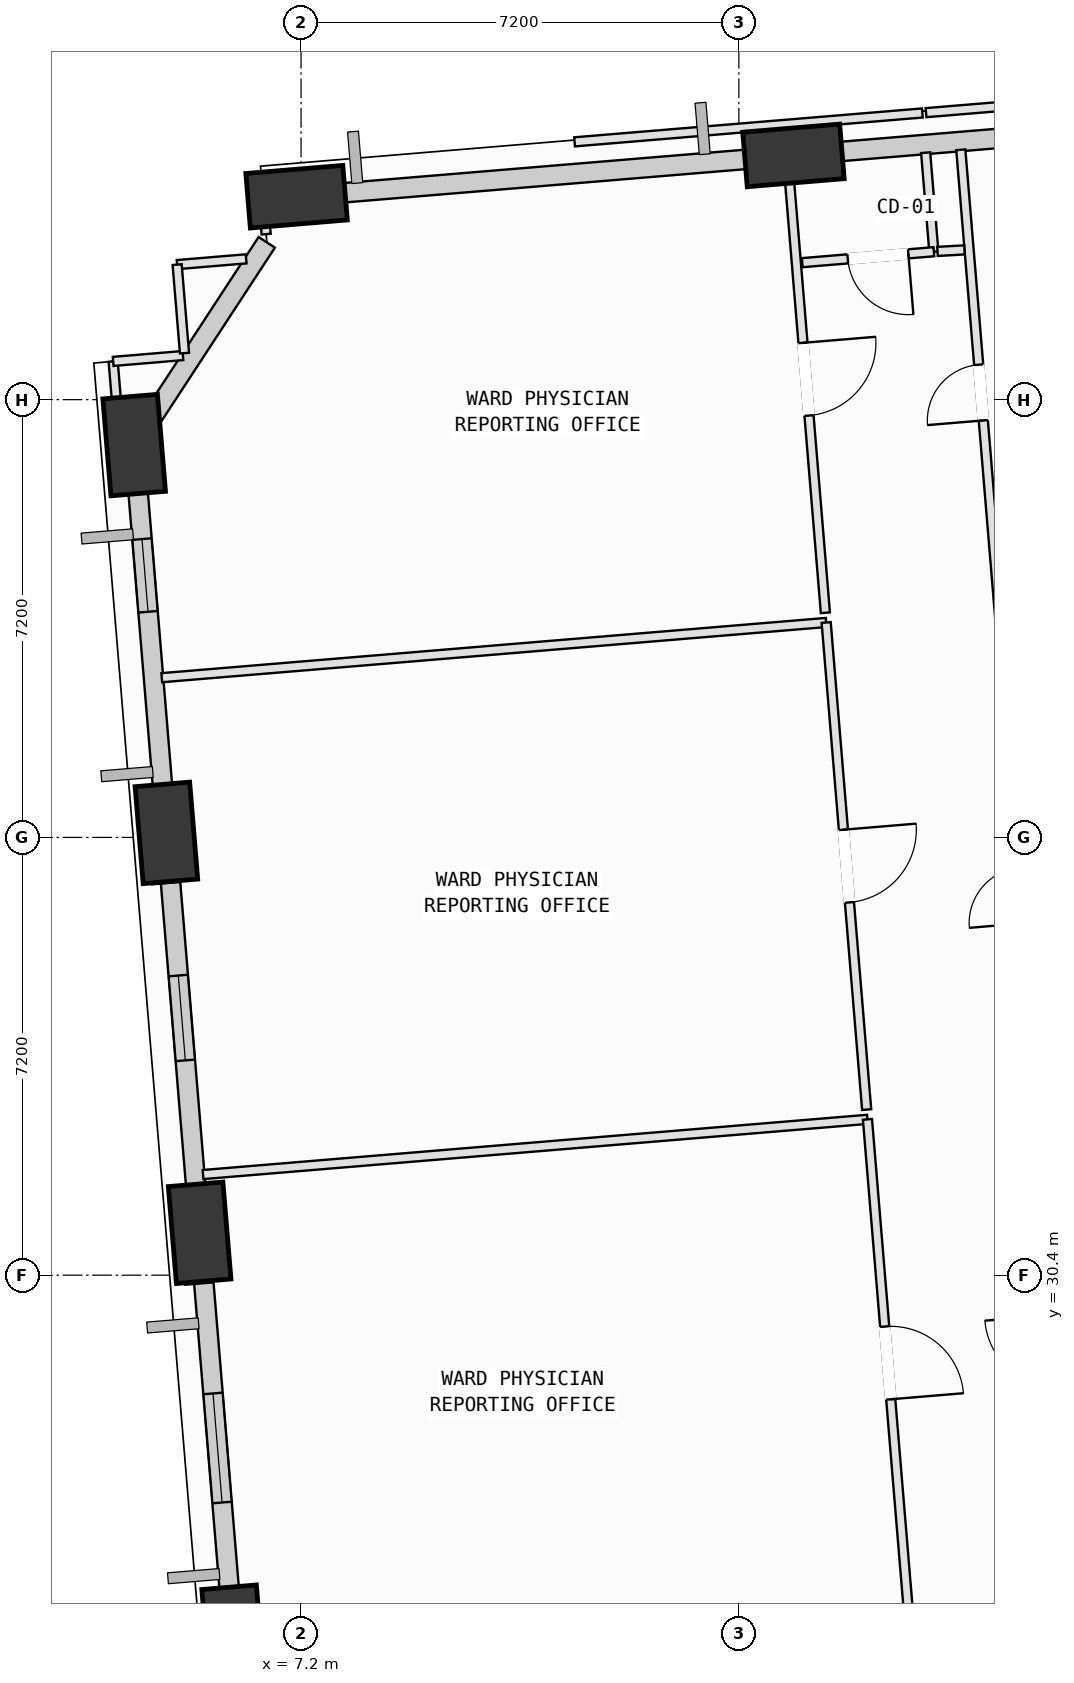
"""IFC4 building model, lengths in metres.
Left out: names, types, materials, properties, quantities, classifications, styles, units other than length and angle.
Written with IfcOpenShell. Run it as: python <this file> out.ifc"""

import sys

from ifc_helpers import new_model, si_unit, direction, frame, frame_2d, origin, origin_2d, place, context, subcontext, project, spatial, rectangle, extrude, element, fill, save


model = new_model("IFC4")
c1 = context("Model", 3, precision=1e-05, world=origin(), true_north=direction((0.0, 1.0)))
c2 = subcontext(c1, "Body", "Model", "MODEL_VIEW")
j1 = project(units=[si_unit("LENGTHUNIT", "METRE"), si_unit("PLANEANGLEUNIT", "RADIAN")], contexts=[c1])
p1 = place(None, origin())
s1 = spatial("IfcSite", under=j1, at=p1, CompositionType="ELEMENT")
p2 = place(p1, origin())
s2 = spatial("IfcBuilding", under=s1, at=p2, CompositionType="ELEMENT")
p3 = place(p2, frame((0.0, 0.0, 43.0)))
s3 = spatial("IfcBuildingStorey", under=s2, at=p3, CompositionType="ELEMENT", Elevation=43.0)
p4 = place(p3, frame((15.298, 48.817, 0.002), z_axis=(-0.098134622607, -0.076131615808, 0.992256807949), x_axis=(0.675776401086, -0.737034920239, 0.010285041756)))
e1 = element("IfcColumn", 1, at=p4, inside=s3, PredefinedType="COLUMN", context=c2, shape_type="SweptSolid", body=[
    extrude(rectangle(XDim=1.6, YDim=0.9, at=origin_2d()), origin(), (0.0, 0.0, 1.0), 4.028),
])
p5 = place(p3, frame((7.126, 48.138, 0.002), z_axis=(-0.094776858369, -0.109343964789, 0.989475236922), x_axis=(0.806719200404, -0.590813465047, 0.011982538055)))
e2 = element("IfcColumn", 2, at=p5, inside=s3, PredefinedType="COLUMN", context=c2, shape_type="SweptSolid", body=[
    extrude(rectangle(XDim=1.6, YDim=0.9, at=origin_2d()), origin(), (0.0, 0.0, 1.0), 4.039),
])
p6 = place(p3, frame((4.456, 44.052, 0.002), z_axis=(-0.077989674044, -0.120188737985, 0.989682917911), x_axis=(0.467404280467, 0.872436977257, 0.142782909749)))
e3 = element("IfcColumn", 3, at=p6, inside=s3, PredefinedType="COLUMN", context=c2, shape_type="SweptSolid", body=[
    extrude(rectangle(XDim=1.6, YDim=0.9, at=origin_2d()), origin(), (0.0, 0.0, 1.0), 4.038),
])
p7 = place(p3, frame((4.986, 37.675, 0.002), z_axis=(-0.051975028871, -0.118064488659, 0.991644781609), x_axis=(0.322383773593, 0.93783910321, 0.128555509462)))
e4 = element("IfcColumn", 4, at=p7, inside=s3, PredefinedType="COLUMN", context=c2, shape_type="SweptSolid", body=[
    extrude(rectangle(XDim=1.6, YDim=0.9, at=origin_2d()), origin(), (0.0, 0.0, 1.0), 4.03),
])
p8 = place(p3, frame((5.532, 31.097, 0.002), z_axis=(-0.024930331489, -0.115734969538, 0.992967217685), x_axis=(0.127428183267, 0.98480559743, 0.117983021577)))
e5 = element("IfcColumn", 5, at=p8, inside=s3, PredefinedType="COLUMN", context=c2, shape_type="SweptSolid", body=[
    extrude(rectangle(XDim=1.6, YDim=0.9, at=origin_2d()), origin(), (0.0, 0.0, 1.0), 4.025),
])
p9 = place(p3, frame((6.083, 24.47, 0.002), z_axis=(0.002306361863, -0.113315199963, 0.993556413171), x_axis=(-0.102939792592, 0.988253930152, 0.112949407435)))
e6 = element("IfcColumn", 6, at=p9, inside=s3, PredefinedType="COLUMN", context=c2, shape_type="SweptSolid", body=[
    extrude(rectangle(XDim=1.6, YDim=0.9, at=origin_2d()), origin(), (0.0, 0.0, 1.0), 4.022),
])
p10 = place(p3, frame((15.679, 48.849, 0.0), z_axis=(0.0, 0.0, 1.0), x_axis=(0.996566404155, 0.082797355694, 0.0)))
e7 = element("IfcWall", 7, at=p10, inside=s3, PredefinedType="SOLIDWALL", context=c2, shape_type="SweptSolid", body=[
    extrude(rectangle(XDim=7.003, YDim=0.32, at=frame_2d((3.501, 0.0))), origin(), (0.0, 0.0, 1.0), 3.165),
])
p11 = place(p3, frame((7.488, 48.168, 0.0), z_axis=(0.0, 0.0, 1.0), x_axis=(0.996565595582, 0.082807087273, 0.0)))
e8 = element("IfcWall", 8, at=p11, inside=s3, PredefinedType="SOLIDWALL", context=c2, shape_type="SweptSolid", body=[
    extrude(rectangle(XDim=7.035, YDim=0.32, at=frame_2d((3.517, 0.0))), origin(), (0.0, 0.0, 1.0), 3.165),
])
p12 = place(p3, frame((4.63, 44.319, 0.0), z_axis=(0.0, 0.0, 1.0), x_axis=(0.547193741188, 0.837005979432, 0.0)))
e9 = element("IfcWall", 9, at=p12, inside=s3, PredefinedType="SOLIDWALL", context=c2, shape_type="SweptSolid", body=[
    extrude(rectangle(XDim=3.666, YDim=0.32, at=frame_2d((1.833, 0.0))), origin(), (0.0, 0.0, 1.0), 3.165),
])
p13 = place(p3, frame((4.955, 38.04, 0.0), z_axis=(0.0, 0.0, 1.0), x_axis=(-0.082778568816, 0.99656796484, 0.0)))
e10 = element("IfcWall", 10, at=p13, inside=s3, PredefinedType="SOLIDWALL", context=c2, shape_type="SweptSolid", body=[
    extrude(rectangle(XDim=5.223, YDim=0.32, at=frame_2d((2.612, 0.0))), origin(), (0.0, 0.0, 1.0), 3.165),
])
p14 = place(p13, frame((3.282, 0.0, 0.75)))
e11 = element("IfcOpeningElement", 11, at=p14, cuts=e10, PredefinedType="OPENING", context=c2, shape_type="SweptSolid", body=[
    extrude(rectangle(XDim=1.2, YDim=1.75, at=frame_2d((0.6, 0.875))), frame((0.0, 0.17, 0.0), z_axis=(0.0, -1.0, 0.0), x_axis=(1.0, 0.0, 0.0)), (0.0, 0.0, 1.0), 0.34),
])
p15 = place(p3, frame((5.501, 31.472, 0.0), z_axis=(0.0, 0.0, 1.0), x_axis=(-0.082813534863, 0.996565059815, 0.0)))
e12 = element("IfcWall", 12, at=p15, inside=s3, PredefinedType="SOLIDWALL", context=c2, shape_type="SweptSolid", body=[
    extrude(rectangle(XDim=5.401, YDim=0.32, at=frame_2d((2.7, 0.0))), origin(), (0.0, 0.0, 1.0), 3.165),
])
p16 = place(p15, frame((2.469, 0.0, 0.75)))
e13 = element("IfcOpeningElement", 13, at=p16, cuts=e12, PredefinedType="OPENING", context=c2, shape_type="SweptSolid", body=[
    extrude(rectangle(XDim=1.4, YDim=1.85, at=frame_2d((0.7, 0.925))), frame((0.0, 0.17, 0.0), z_axis=(0.0, -1.0, 0.0), x_axis=(1.0, 0.0, 0.0)), (0.0, 0.0, 1.0), 0.34),
])
p17 = place(p3, frame((6.051, 24.849, 0.0), z_axis=(0.0, 0.0, 1.0), x_axis=(-0.082785398729, 0.996567397499, 0.0)))
e14 = element("IfcWall", 14, at=p17, inside=s3, PredefinedType="SOLIDWALL", context=c2, shape_type="SweptSolid", body=[
    extrude(rectangle(XDim=5.438, YDim=0.32, at=frame_2d((2.719, 0.0))), origin(), (0.0, 0.0, 1.0), 3.165),
])
p18 = place(p17, frame((1.818, 0.0, 0.75)))
e15 = element("IfcOpeningElement", 15, at=p18, cuts=e14, PredefinedType="OPENING", context=c2, shape_type="SweptSolid", body=[
    extrude(rectangle(XDim=1.8, YDim=2.05, at=frame_2d((0.9, 1.025))), frame((0.0, 0.17, 0.0), z_axis=(0.0, -1.0, 0.0), x_axis=(1.0, 0.0, 0.0)), (0.0, 0.0, 1.0), 0.34),
])
p19 = place(p3, frame((5.588, 32.055, 0.0), z_axis=(0.0, 0.0, 1.0), x_axis=(0.996565539079, 0.082807767273, 0.0)))
e16 = element("IfcWall", 16, at=p19, inside=s3, PredefinedType="PARTITIONING", context=c2, shape_type="SweptSolid", body=[
    extrude(rectangle(XDim=10.965, YDim=0.15, at=frame_2d((5.482, 0.0))), origin(), (0.0, 0.0, 1.0), 3.365),
])
p20 = place(p3, frame((16.515, 32.963, 0.0), z_axis=(0.0, 0.0, 1.0), x_axis=(0.082841912697, -0.996562701239, 0.0)))
e17 = element("IfcWall", 17, at=p20, inside=s3, PredefinedType="PARTITIONING", context=c2, shape_type="SweptSolid", body=[
    extrude(rectangle(XDim=8.04, YDim=0.15, at=frame_2d((4.02, 0.0))), origin(), (0.0, 0.0, 1.0), 3.78),
])
p21 = place(p20, frame((3.42, 0.0, 0.0)))
e18 = element("IfcOpeningElement", 18, at=p21, cuts=e17, PredefinedType="OPENING", context=c2, shape_type="SweptSolid", body=[
    extrude(rectangle(XDim=1.2, YDim=2.15, at=frame_2d((0.6, 1.075))), frame((0.0, 0.085, 0.0), z_axis=(0.0, -1.0, 0.0), x_axis=(1.0, 0.0, 0.0)), (0.0, 0.0, 1.0), 0.17),
])
p22 = place(p3, frame((5.372, 30.249, 0.0), z_axis=(0.0, 0.0, 1.0), x_axis=(-0.082861496646, 0.996561073078, 0.0)))
e19 = element("IfcWall", 19, at=p22, inside=s3, PredefinedType="PARTITIONING", context=c2, shape_type="SweptSolid", body=[
    extrude(rectangle(XDim=1.208, YDim=0.15, at=frame_2d((0.604, 0.0))), origin(), (0.0, 0.0, 1.0), 3.165),
])
p23 = place(p3, frame((4.909, 40.227, 0.0), z_axis=(0.0, 0.0, 1.0), x_axis=(0.996565539079, 0.082807767273, 0.0)))
e20 = element("IfcWall", 20, at=p23, inside=s3, PredefinedType="PARTITIONING", context=c2, shape_type="SweptSolid", body=[
    extrude(rectangle(XDim=10.965, YDim=0.15, at=frame_2d((5.482, 0.0))), origin(), (0.0, 0.0, 1.0), 3.78),
])
p24 = place(p3, frame((15.836, 41.135, 0.0), z_axis=(0.0, 0.0, 1.0), x_axis=(0.082841912697, -0.996562701239, 0.0)))
e21 = element("IfcWall", 21, at=p24, inside=s3, PredefinedType="PARTITIONING", context=c2, shape_type="SweptSolid", body=[
    extrude(rectangle(XDim=8.04, YDim=0.15, at=frame_2d((4.02, 0.0))), origin(), (0.0, 0.0, 1.0), 3.78),
])
p25 = place(p24, frame((3.42, 0.0, 0.0)))
e22 = element("IfcOpeningElement", 22, at=p25, cuts=e21, PredefinedType="OPENING", context=c2, shape_type="SweptSolid", body=[
    extrude(rectangle(XDim=1.2, YDim=2.15, at=frame_2d((0.6, 1.075))), frame((0.0, 0.085, 0.0), z_axis=(0.0, -1.0, 0.0), x_axis=(1.0, 0.0, 0.0)), (0.0, 0.0, 1.0), 0.17),
])
p26 = place(p3, frame((4.824, 36.835, 0.0), z_axis=(0.0, 0.0, 1.0), x_axis=(-0.082264475924, 0.99661053376, 0.0)))
e23 = element("IfcWall", 23, at=p26, inside=s3, PredefinedType="PARTITIONING", context=c2, shape_type="SweptSolid", body=[
    extrude(rectangle(XDim=1.19, YDim=0.15, at=frame_2d((0.595, 0.0))), origin(), (0.0, 0.0, 1.0), 3.165),
])
p27 = place(p3, frame((5.162, 47.021, 0.0), z_axis=(0.0, 0.0, 1.0), x_axis=(0.99651761388, 0.08338252351, 0.0)))
e24 = element("IfcWall", 24, at=p27, inside=s3, PredefinedType="PARTITIONING", context=c2, shape_type="SweptSolid", body=[
    extrude(rectangle(XDim=1.139, YDim=0.15, at=frame_2d((0.569, 0.0))), origin(), (0.0, 0.0, 1.0), 3.78),
])
p28 = place(p3, frame((6.626, 47.522, 0.0), z_axis=(0.0, 0.0, 1.0), x_axis=(-0.083508018718, 0.996507105248, 0.0)))
e25 = element("IfcWall", 25, at=p28, inside=s3, PredefinedType="PARTITIONING", context=c2, shape_type="SweptSolid", body=[
    extrude(rectangle(XDim=0.743, YDim=0.15, at=frame_2d((0.371, 0.0))), origin(), (0.0, 0.0, 1.0), 3.78),
])
p29 = place(p3, frame((6.564, 48.262, 0.0), z_axis=(0.0, 0.0, 1.0), x_axis=(0.996538380198, 0.083133968949, 0.0)))
e26 = element("IfcWall", 26, at=p29, inside=s3, PredefinedType="PARTITIONING", context=c2, shape_type="SweptSolid", body=[
    extrude(rectangle(XDim=0.913, YDim=0.15, at=frame_2d((0.457, 0.0))), origin(), (0.0, 0.0, 1.0), 3.78),
])
p30 = place(p3, frame((14.485, 48.92, 0.0), z_axis=(0.0, 0.0, 1.0), x_axis=(0.996572077737, 0.082729038891, 0.0)))
e27 = element("IfcWall", 27, at=p30, inside=s3, PredefinedType="PARTITIONING", context=c2, shape_type="SweptSolid", body=[
    extrude(rectangle(XDim=0.702, YDim=0.15, at=frame_2d((0.351, 0.0))), origin(), (0.0, 0.0, 1.0), 3.78),
])
p31 = place(p3, frame((15.185, 48.978, 0.0), z_axis=(0.0, 0.0, 1.0), x_axis=(0.082746711322, -0.996570610527, 0.0)))
e28 = element("IfcWall", 28, at=p31, inside=s3, PredefinedType="PARTITIONING", context=c2, shape_type="SweptSolid", body=[
    extrude(rectangle(XDim=7.709, YDim=0.15, at=frame_2d((3.855, 0.0))), origin(), (0.0, 0.0, 1.0), 2.865),
])
p32 = place(p31, frame((3.255, 0.0, 0.0)))
e29 = element("IfcOpeningElement", 29, at=p32, cuts=e28, PredefinedType="OPENING", context=c2, shape_type="SweptSolid", body=[
    extrude(rectangle(XDim=1.2, YDim=2.15, at=frame_2d((0.6, 1.075))), frame((0.0, 0.085, 0.0), z_axis=(0.0, -1.0, 0.0), x_axis=(1.0, 0.0, 0.0)), (0.0, 0.0, 1.0), 0.17),
])
p33 = place(p3, frame((4.293, 43.226, 0.0), z_axis=(0.0, 0.0, 1.0), x_axis=(-0.082725557209, 0.996572366757, 0.0)))
e30 = element("IfcWall", 30, at=p33, inside=s3, PredefinedType="PARTITIONING", context=c2, shape_type="SweptSolid", body=[
    extrude(rectangle(XDim=2.21, YDim=0.15, at=frame_2d((1.105, 0.0))), origin(), (0.0, 0.0, 1.0), 3.165),
])
p34 = place(p3, frame((4.11, 45.429, 0.0), z_axis=(0.0, 0.0, 1.0), x_axis=(0.996519376551, 0.083361454871, 0.0)))
e31 = element("IfcWall", 31, at=p34, inside=s3, PredefinedType="PARTITIONING", context=c2, shape_type="SweptSolid", body=[
    extrude(rectangle(XDim=1.151, YDim=0.15, at=frame_2d((0.575, 0.0))), origin(), (0.0, 0.0, 1.0), 3.78),
])
p35 = place(p3, frame((5.283, 45.565, 0.0), z_axis=(0.0, 0.0, 1.0), x_axis=(-0.082713583752, 0.996573360603, 0.0)))
e32 = element("IfcWall", 32, at=p35, inside=s3, PredefinedType="PARTITIONING", context=c2, shape_type="SweptSolid", body=[
    extrude(rectangle(XDim=1.461, YDim=0.15, at=frame_2d((0.73, 0.0))), origin(), (0.0, 0.0, 1.0), 3.78),
])
p36 = place(p3, frame((18.714, 40.923, 0.0), z_axis=(0.0, 0.0, 1.0), x_axis=(-0.082858919776, 0.996561287334, 0.0)))
e33 = element("IfcWall", 33, at=p36, inside=s3, PredefinedType="PARTITIONING", context=c2, shape_type="SweptSolid", body=[
    extrude(rectangle(XDim=8.014, YDim=0.15, at=frame_2d((4.007, 0.0))), origin(), (0.0, 0.0, 1.0), 3.78),
])
p37 = place(p36, frame((3.547, 0.0, 0.0)))
e34 = element("IfcOpeningElement", 34, at=p37, cuts=e33, PredefinedType="OPENING", context=c2, shape_type="SweptSolid", body=[
    extrude(rectangle(XDim=0.92, YDim=2.1, at=frame_2d((0.46, 1.05))), frame((0.0, 0.085, 0.0), z_axis=(0.0, -1.0, 0.0), x_axis=(1.0, 0.0, 0.0)), (0.0, 0.0, 1.0), 0.17),
])
p38 = place(p3, frame((11.698, 49.04, 0.0), z_axis=(0.0, 0.0, 1.0), x_axis=(0.996571817192, 0.082732177406, 0.0)))
e35 = element("IfcWall", 35, at=p38, inside=s3, PredefinedType="PARTITIONING", context=c2, shape_type="SweptSolid", body=[
    extrude(rectangle(XDim=5.74, YDim=0.15, at=frame_2d((2.87, 0.0))), origin(), (0.0, 0.0, 1.0), 3.78),
])
p39 = place(p3, frame((17.472, 48.862, 0.0), z_axis=(0.0, 0.0, 1.0), x_axis=(0.08258816432, -0.996583762217, 0.0)))
e36 = element("IfcWall", 36, at=p39, inside=s3, PredefinedType="PARTITIONING", context=c2, shape_type="SweptSolid", body=[
    extrude(rectangle(XDim=1.635, YDim=0.15, at=frame_2d((0.817, 0.0))), origin(), (0.0, 0.0, 1.0), 3.78),
])
p40 = place(p3, frame((17.607, 47.233, 0.0), z_axis=(0.0, 0.0, 1.0), x_axis=(-0.996564333674, -0.082822272657, 0.0)))
e37 = element("IfcWall", 37, at=p40, inside=s3, PredefinedType="PARTITIONING", context=c2, shape_type="SweptSolid", body=[
    extrude(rectangle(XDim=2.173, YDim=0.15, at=frame_2d((1.086, 0.0))), origin(), (0.0, 0.0, 1.0), 3.78),
])
p41 = place(p40, frame((0.421, 0.0, 0.0)))
e38 = element("IfcOpeningElement", 38, at=p41, cuts=e37, PredefinedType="OPENING", context=c2, shape_type="SweptSolid", body=[
    extrude(rectangle(XDim=1.0, YDim=2.12, at=frame_2d((0.5, 1.06))), frame((0.0, 0.085, 0.0), z_axis=(0.0, -1.0, 0.0), x_axis=(1.0, 0.0, 0.0)), (0.0, 0.0, 1.0), 0.17),
])
p42 = place(p3, frame((18.11, 47.263, 0.0), z_axis=(0.0, 0.0, 1.0), x_axis=(-0.998424603538, -0.05610981243, 0.0)))
e39 = element("IfcWall", 39, at=p42, inside=s3, PredefinedType="PARTITIONING", context=c2, shape_type="SweptSolid", body=[
    extrude(rectangle(XDim=0.444, YDim=0.15, at=frame_2d((0.222, 0.0))), origin(), (0.0, 0.0, 1.0), 3.78),
])
p43 = place(p3, frame((17.478, 49.52, 0.0), z_axis=(0.0, 0.0, 1.0), x_axis=(0.996568309292, 0.082774421865, 0.0)))
e40 = element("IfcWall", 40, at=p43, inside=s3, PredefinedType="PARTITIONING", context=c2, shape_type="SweptSolid", body=[
    extrude(rectangle(XDim=5.74, YDim=0.15, at=frame_2d((2.87, 0.0))), origin(), (0.0, 0.0, 1.0), 3.78),
])
p44 = place(p14, origin())
e41 = element("IfcWindow", 41, at=p44, inside=s3, PartitioningType="SINGLE_PANEL", PredefinedType="WINDOW", context=c2, shape_type="SweptSolid", body=[
    extrude(rectangle(XDim=1.2, YDim=1.75, at=frame_2d((0.6, 0.875))), frame((0.0, 0.03, 0.0), z_axis=(0.0, -1.0, 0.0), x_axis=(1.0, 0.0, 0.0)), (0.0, 0.0, 1.0), 0.06),
])
fill(e11, e41)
p45 = place(p16, origin())
e42 = element("IfcWindow", 42, at=p45, inside=s3, PartitioningType="SINGLE_PANEL", PredefinedType="WINDOW", context=c2, shape_type="SweptSolid", body=[
    extrude(rectangle(XDim=1.4, YDim=1.85, at=frame_2d((0.7, 0.925))), frame((0.0, 0.03, 0.0), z_axis=(0.0, -1.0, 0.0), x_axis=(1.0, 0.0, 0.0)), (0.0, 0.0, 1.0), 0.06),
])
fill(e13, e42)
p46 = place(p18, origin())
e43 = element("IfcWindow", 43, at=p46, inside=s3, PartitioningType="SINGLE_PANEL", PredefinedType="WINDOW", context=c2, shape_type="SweptSolid", body=[
    extrude(rectangle(XDim=1.8, YDim=2.05, at=frame_2d((0.9, 1.025))), frame((0.0, 0.03, 0.0), z_axis=(0.0, -1.0, 0.0), x_axis=(1.0, 0.0, 0.0)), (0.0, 0.0, 1.0), 0.06),
])
fill(e15, e43)
p47 = place(p21, origin())
e44 = element("IfcDoor", 44, at=p47, inside=s3, OperationType="SINGLE_SWING_RIGHT", PredefinedType="DOOR", context=c2, shape_type="SweptSolid", body=[
    extrude(rectangle(XDim=1.2, YDim=2.15, at=frame_2d((0.6, 1.075))), frame((0.0, 0.025, 0.0), z_axis=(0.0, -1.0, 0.0), x_axis=(1.0, 0.0, 0.0)), (0.0, 0.0, 1.0), 0.05),
])
fill(e18, e44)
p48 = place(p25, origin())
e45 = element("IfcDoor", 45, at=p48, inside=s3, OperationType="SINGLE_SWING_LEFT", PredefinedType="DOOR", context=c2, shape_type="SweptSolid", body=[
    extrude(rectangle(XDim=1.2, YDim=2.15, at=frame_2d((0.6, 1.075))), frame((0.0, 0.025, 0.0), z_axis=(0.0, -1.0, 0.0), x_axis=(1.0, 0.0, 0.0)), (0.0, 0.0, 1.0), 0.05),
])
fill(e22, e45)
p49 = place(p32, origin())
e46 = element("IfcDoor", 46, at=p49, inside=s3, OperationType="SINGLE_SWING_LEFT", PredefinedType="DOOR", context=c2, shape_type="SweptSolid", body=[
    extrude(rectangle(XDim=1.2, YDim=2.15, at=frame_2d((0.6, 1.075))), frame((0.0, 0.025, 0.0), z_axis=(0.0, -1.0, 0.0), x_axis=(1.0, 0.0, 0.0)), (0.0, 0.0, 1.0), 0.05),
])
fill(e29, e46)
p50 = place(p37, origin())
e47 = element("IfcDoor", 47, at=p50, inside=s3, OperationType="SINGLE_SWING_LEFT", PredefinedType="DOOR", context=c2, shape_type="SweptSolid", body=[
    extrude(rectangle(XDim=0.92, YDim=2.1, at=frame_2d((0.46, 1.05))), frame((0.0, 0.025, 0.0), z_axis=(0.0, -1.0, 0.0), x_axis=(1.0, 0.0, 0.0)), (0.0, 0.0, 1.0), 0.05),
])
fill(e34, e47)
p51 = place(p41, origin())
e48 = element("IfcDoor", 48, at=p51, inside=s3, OperationType="SINGLE_SWING_LEFT", PredefinedType="DOOR", context=c2, shape_type="SweptSolid", body=[
    extrude(rectangle(XDim=1.0, YDim=2.12, at=frame_2d((0.5, 1.06))), frame((0.0, 0.025, 0.0), z_axis=(0.0, -1.0, 0.0), x_axis=(1.0, 0.0, 0.0)), (0.0, 0.0, 1.0), 0.05),
])
fill(e38, e48)
save(model, sys.argv[1])
